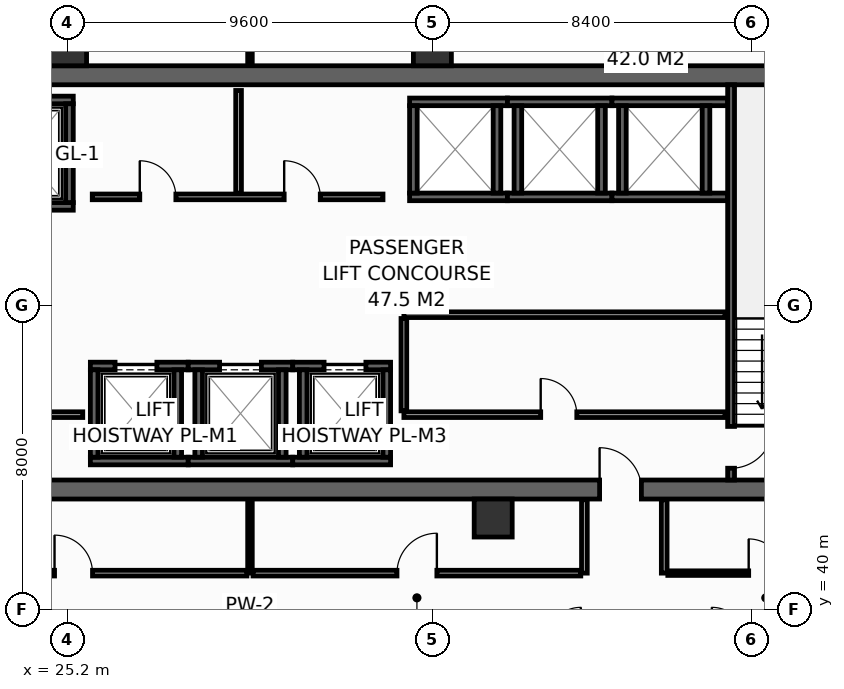
"""IFC4 building model, lengths in metres.
Left out: names, types, materials, properties, quantities, classifications, styles, units other than length and angle.
Written with IfcOpenShell. Run it as: python <this file> out.ifc"""

import sys

from ifc_helpers import new_model, si_unit, direction, frame, frame_2d, origin, origin_2d, place, context, subcontext, project, spatial, rectangle, hollow_rectangle, extrude, element, fill, save


model = new_model("IFC4")
c1 = context("Model", 3, precision=1e-05, world=origin(), true_north=direction((0.0, 1.0)))
c2 = subcontext(c1, "Body", "Model", "MODEL_VIEW")
j1 = project(units=[si_unit("LENGTHUNIT", "METRE"), si_unit("PLANEANGLEUNIT", "RADIAN")], contexts=[c1])
p1 = place(None, origin())
s1 = spatial("IfcSite", under=j1, at=p1, CompositionType="ELEMENT")
p2 = place(p1, origin())
s2 = spatial("IfcBuilding", under=s1, at=p2, CompositionType="ELEMENT")
p3 = place(p2, frame((0.0, 0.0, 148.6)))
s3 = spatial("IfcBuildingStorey", under=s2, at=p3, CompositionType="ELEMENT", Elevation=148.6)
p4 = place(p3, frame((13.6, 43.15, 0.0), z_axis=(0.0, 0.0, 1.0), x_axis=(1.0, 0.0, 0.0)))
e1 = element("IfcWall", 1, at=p4, inside=s3, PredefinedType="SHEAR", context=c2, shape_type="SweptSolid", body=[
    extrude(rectangle(XDim=32.7, YDim=0.5, at=frame_2d((16.35, 0.0))), origin(), (0.0, 0.0, 1.0), 3.55),
])
p5 = place(p4, frame((5.4, 0.0, 0.0)))
e2 = element("IfcOpeningElement", 2, at=p5, cuts=e1, PredefinedType="OPENING", context=c2, shape_type="SweptSolid", body=[
    extrude(rectangle(XDim=1.1, YDim=2.15, at=frame_2d((0.55, 1.075))), frame((0.0, 0.26, 0.0), z_axis=(0.0, -1.0, 0.0), x_axis=(1.0, 0.0, 0.0)), (0.0, 0.0, 1.0), 0.52),
])
p6 = place(p4, frame((25.6, 0.0, 0.0)))
e3 = element("IfcOpeningElement", 3, at=p6, cuts=e1, PredefinedType="OPENING", context=c2, shape_type="SweptSolid", body=[
    extrude(rectangle(XDim=1.1, YDim=2.15, at=frame_2d((0.55, 1.075))), frame((0.0, 0.26, 0.0), z_axis=(0.0, -1.0, 0.0), x_axis=(1.0, 0.0, 0.0)), (0.0, 0.0, 1.0), 0.52),
])
p7 = place(p3, frame((13.6, 54.05, 0.0), z_axis=(0.0, 0.0, 1.0), x_axis=(1.0, 0.0, 0.0)))
e4 = element("IfcWall", 4, at=p7, inside=s3, PredefinedType="SHEAR", context=c2, shape_type="SweptSolid", body=[
    extrude(rectangle(XDim=32.7, YDim=0.5, at=frame_2d((16.35, 0.0))), origin(), (0.0, 0.0, 1.0), 3.55),
])
for number, where, z_axis, x_axis in (
    (5, (25.2, 54.8, 0.0), (0.0, 0.0, 1.0), (1.0, 0.0, 0.0)),
    (6, (34.8, 54.8, 0.0), (0.0, 0.0, 1.0), (1.0, 0.0, 0.0)),
    (7, (36.4, 42.4, 0.0), (0.0, 0.0, 1.0), (1.0, 0.0, 0.0)),
):
    element("IfcColumn", number, at=place(p3, frame(where, z_axis=z_axis, x_axis=x_axis)), inside=s3, PredefinedType="COLUMN", context=c2, shape_type="SweptSolid", body=[
        extrude(hollow_rectangle(XDim=1.0, YDim=1.0, WallThickness=0.045, at=origin_2d()), origin(), (0.0, 0.0, 1.0), 3.8),
    ])
p8 = place(p3, frame((22.5, 50.6, 0.0), z_axis=(0.0, 0.0, 1.0), x_axis=(1.0, 0.0, 0.0)))
e8 = element("IfcWall", 8, at=p8, inside=s3, PredefinedType="SHEAR", context=c2, shape_type="SweptSolid", body=[
    extrude(rectangle(XDim=2.85, YDim=0.2, at=frame_2d((1.425, 0.0))), origin(), (0.0, 0.0, 1.0), 3.55),
])
p9 = place(p8, frame((0.925, 0.0, 0.0)))
e9 = element("IfcOpeningElement", 9, at=p9, cuts=e8, PredefinedType="OPENING", context=c2, shape_type="SweptSolid", body=[
    extrude(rectangle(XDim=1.25, YDim=2.3, at=frame_2d((0.625, 1.15))), frame((0.0, 0.11, 0.0), z_axis=(0.0, -1.0, 0.0), x_axis=(1.0, 0.0, 0.0)), (0.0, 0.0, 1.0), 0.22),
])
p10 = place(p3, frame((22.5, 53.4, 0.0), z_axis=(0.0, 0.0, 1.0), x_axis=(1.0, 0.0, 0.0)))
e10 = element("IfcWall", 10, at=p10, inside=s3, PredefinedType="SHEAR", context=c2, shape_type="SweptSolid", body=[
    extrude(rectangle(XDim=2.85, YDim=0.2, at=frame_2d((1.425, 0.0))), origin(), (0.0, 0.0, 1.0), 3.55),
])
p11 = place(p3, frame((25.25, 50.7, 0.0), z_axis=(0.0, 0.0, 1.0), x_axis=(0.0, 1.0, 0.0)))
e11 = element("IfcWall", 11, at=p11, inside=s3, PredefinedType="SHEAR", context=c2, shape_type="SweptSolid", body=[
    extrude(rectangle(XDim=2.6, YDim=0.2, at=frame_2d((1.3, 0.0))), origin(), (0.0, 0.0, 1.0), 3.55),
])
p12 = place(p3, frame((25.8, 43.9, 0.0), z_axis=(0.0, 0.0, 1.0), x_axis=(1.0, 0.0, 0.0)))
e12 = element("IfcWall", 12, at=p12, inside=s3, PredefinedType="SHEAR", context=c2, shape_type="SweptSolid", body=[
    extrude(rectangle(XDim=2.575, YDim=0.2, at=frame_2d((1.288, 0.0))), origin(), (0.0, 0.0, 1.0), 3.55),
])
p13 = place(p3, frame((25.8, 46.4, 0.0), z_axis=(0.0, 0.0, 1.0), x_axis=(1.0, 0.0, 0.0)))
e13 = element("IfcWall", 13, at=p13, inside=s3, PredefinedType="SHEAR", context=c2, shape_type="SweptSolid", body=[
    extrude(rectangle(XDim=2.575, YDim=0.2, at=frame_2d((1.288, 0.0))), origin(), (0.0, 0.0, 1.0), 3.55),
])
p14 = place(p13, frame((0.65, 0.0, 0.0)))
e14 = element("IfcOpeningElement", 14, at=p14, cuts=e13, PredefinedType="OPENING", context=c2, shape_type="SweptSolid", body=[
    extrude(rectangle(XDim=1.1, YDim=2.2, at=frame_2d((0.55, 1.1))), frame((0.0, 0.11, 0.0), z_axis=(0.0, -1.0, 0.0), x_axis=(1.0, 0.0, 0.0)), (0.0, 0.0, 1.0), 0.22),
])
for number, where, z_axis, x_axis in (
    (15, (25.9, 44.0, 0.0), (0.0, 0.0, 1.0), (0.0, 1.0, 0.0)),
    (16, (28.1, 44.0, 0.0), (0.0, 0.0, 1.0), (0.0, 1.0, 0.0)),
):
    element("IfcWall", number, at=place(p3, frame(where, z_axis=z_axis, x_axis=x_axis)), inside=s3, PredefinedType="SHEAR", context=c2, shape_type="SweptSolid", body=[
        extrude(rectangle(XDim=2.3, YDim=0.2, at=frame_2d((1.15, 0.0))), origin(), (0.0, 0.0, 1.0), 3.55),
    ])
p15 = place(p3, frame((28.375, 43.9, 0.0), z_axis=(0.0, 0.0, 1.0), x_axis=(1.0, 0.0, 0.0)))
e17 = element("IfcWall", 17, at=p15, inside=s3, PredefinedType="SHEAR", context=c2, shape_type="SweptSolid", body=[
    extrude(rectangle(XDim=2.75, YDim=0.2, at=frame_2d((1.375, 0.0))), origin(), (0.0, 0.0, 1.0), 3.55),
])
p16 = place(p3, frame((28.375, 46.4, 0.0), z_axis=(0.0, 0.0, 1.0), x_axis=(1.0, 0.0, 0.0)))
e18 = element("IfcWall", 18, at=p16, inside=s3, PredefinedType="SHEAR", context=c2, shape_type="SweptSolid", body=[
    extrude(rectangle(XDim=2.75, YDim=0.2, at=frame_2d((1.375, 0.0))), origin(), (0.0, 0.0, 1.0), 3.55),
])
p17 = place(p16, frame((0.825, 0.0, 0.0)))
e19 = element("IfcOpeningElement", 19, at=p17, cuts=e18, PredefinedType="OPENING", context=c2, shape_type="SweptSolid", body=[
    extrude(rectangle(XDim=1.1, YDim=2.2, at=frame_2d((0.55, 1.1))), frame((0.0, 0.11, 0.0), z_axis=(0.0, -1.0, 0.0), x_axis=(1.0, 0.0, 0.0)), (0.0, 0.0, 1.0), 0.22),
])
for number, where, z_axis, x_axis in (
    (20, (28.65, 44.0, 0.0), (0.0, 0.0, 1.0), (0.0, 1.0, 0.0)),
    (21, (30.85, 44.0, 0.0), (0.0, 0.0, 1.0), (0.0, 1.0, 0.0)),
):
    element("IfcWall", number, at=place(p3, frame(where, z_axis=z_axis, x_axis=x_axis)), inside=s3, PredefinedType="SHEAR", context=c2, shape_type="SweptSolid", body=[
        extrude(rectangle(XDim=2.3, YDim=0.2, at=frame_2d((1.15, 0.0))), origin(), (0.0, 0.0, 1.0), 3.55),
    ])
p18 = place(p3, frame((31.125, 43.9, 0.0), z_axis=(0.0, 0.0, 1.0), x_axis=(1.0, 0.0, 0.0)))
e22 = element("IfcWall", 22, at=p18, inside=s3, PredefinedType="SHEAR", context=c2, shape_type="SweptSolid", body=[
    extrude(rectangle(XDim=2.575, YDim=0.2, at=frame_2d((1.288, 0.0))), origin(), (0.0, 0.0, 1.0), 3.55),
])
p19 = place(p3, frame((31.125, 46.4, 0.0), z_axis=(0.0, 0.0, 1.0), x_axis=(1.0, 0.0, 0.0)))
e23 = element("IfcWall", 23, at=p19, inside=s3, PredefinedType="SHEAR", context=c2, shape_type="SweptSolid", body=[
    extrude(rectangle(XDim=2.575, YDim=0.2, at=frame_2d((1.288, 0.0))), origin(), (0.0, 0.0, 1.0), 3.55),
])
p20 = place(p19, frame((0.825, 0.0, 0.0)))
e24 = element("IfcOpeningElement", 24, at=p20, cuts=e23, PredefinedType="OPENING", context=c2, shape_type="SweptSolid", body=[
    extrude(rectangle(XDim=1.1, YDim=2.2, at=frame_2d((0.55, 1.1))), frame((0.0, 0.11, 0.0), z_axis=(0.0, -1.0, 0.0), x_axis=(1.0, 0.0, 0.0)), (0.0, 0.0, 1.0), 0.22),
])
for number, where, z_axis, x_axis in (
    (25, (31.4, 44.0, 0.0), (0.0, 0.0, 1.0), (0.0, 1.0, 0.0)),
    (26, (33.6, 44.0, 0.0), (0.0, 0.0, 1.0), (0.0, 1.0, 0.0)),
):
    element("IfcWall", number, at=place(p3, frame(where, z_axis=z_axis, x_axis=x_axis)), inside=s3, PredefinedType="SHEAR", context=c2, shape_type="SweptSolid", body=[
        extrude(rectangle(XDim=2.3, YDim=0.2, at=frame_2d((1.15, 0.0))), origin(), (0.0, 0.0, 1.0), 3.55),
    ])
for number, where, z_axis, x_axis in (
    (27, (34.2, 50.85, 0.0), (0.0, 0.0, 1.0), (1.0, 0.0, 0.0)),
    (28, (34.2, 53.35, 0.0), (0.0, 0.0, 1.0), (1.0, 0.0, 0.0)),
):
    element("IfcWall", number, at=place(p3, frame(where, z_axis=z_axis, x_axis=x_axis)), inside=s3, PredefinedType="SHEAR", context=c2, shape_type="SweptSolid", body=[
        extrude(rectangle(XDim=2.575, YDim=0.2, at=frame_2d((1.288, 0.0))), origin(), (0.0, 0.0, 1.0), 3.55),
    ])
for number, where, z_axis, x_axis in (
    (29, (34.3, 50.95, 0.0), (0.0, 0.0, 1.0), (0.0, 1.0, 0.0)),
    (30, (36.5, 50.95, 0.0), (0.0, 0.0, 1.0), (0.0, 1.0, 0.0)),
):
    element("IfcWall", number, at=place(p3, frame(where, z_axis=z_axis, x_axis=x_axis)), inside=s3, PredefinedType="SHEAR", context=c2, shape_type="SweptSolid", body=[
        extrude(rectangle(XDim=2.3, YDim=0.2, at=frame_2d((1.15, 0.0))), origin(), (0.0, 0.0, 1.0), 3.55),
    ])
for number, where, z_axis, x_axis in (
    (31, (36.775, 50.85, 0.0), (0.0, 0.0, 1.0), (1.0, 0.0, 0.0)),
    (32, (36.775, 53.35, 0.0), (0.0, 0.0, 1.0), (1.0, 0.0, 0.0)),
):
    element("IfcWall", number, at=place(p3, frame(where, z_axis=z_axis, x_axis=x_axis)), inside=s3, PredefinedType="SHEAR", context=c2, shape_type="SweptSolid", body=[
        extrude(rectangle(XDim=2.75, YDim=0.2, at=frame_2d((1.375, 0.0))), origin(), (0.0, 0.0, 1.0), 3.55),
    ])
for number, where, z_axis, x_axis in (
    (33, (37.05, 50.95, 0.0), (0.0, 0.0, 1.0), (0.0, 1.0, 0.0)),
    (34, (39.25, 50.95, 0.0), (0.0, 0.0, 1.0), (0.0, 1.0, 0.0)),
):
    element("IfcWall", number, at=place(p3, frame(where, z_axis=z_axis, x_axis=x_axis)), inside=s3, PredefinedType="SHEAR", context=c2, shape_type="SweptSolid", body=[
        extrude(rectangle(XDim=2.3, YDim=0.2, at=frame_2d((1.15, 0.0))), origin(), (0.0, 0.0, 1.0), 3.55),
    ])
for number, where, z_axis, x_axis in (
    (35, (39.525, 50.85, 0.0), (0.0, 0.0, 1.0), (1.0, 0.0, 0.0)),
    (36, (39.525, 53.35, 0.0), (0.0, 0.0, 1.0), (1.0, 0.0, 0.0)),
):
    element("IfcWall", number, at=place(p3, frame(where, z_axis=z_axis, x_axis=x_axis)), inside=s3, PredefinedType="SHEAR", context=c2, shape_type="SweptSolid", body=[
        extrude(rectangle(XDim=3.045, YDim=0.2, at=frame_2d((1.522, 0.0))), origin(), (0.0, 0.0, 1.0), 3.55),
    ])
for number, where, z_axis, x_axis in (
    (37, (39.8, 50.95, 0.0), (0.0, 0.0, 1.0), (0.0, 1.0, 0.0)),
    (38, (42.0, 50.95, 0.0), (0.0, 0.0, 1.0), (0.0, 1.0, 0.0)),
):
    element("IfcWall", number, at=place(p3, frame(where, z_axis=z_axis, x_axis=x_axis)), inside=s3, PredefinedType="SHEAR", context=c2, shape_type="SweptSolid", body=[
        extrude(rectangle(XDim=2.3, YDim=0.2, at=frame_2d((1.15, 0.0))), origin(), (0.0, 0.0, 1.0), 3.55),
    ])
p21 = place(p3, frame((42.66, 53.8, 0.0), z_axis=(0.0, 0.0, 1.0), x_axis=(0.0, -1.0, 0.0)))
e39 = element("IfcWall", 39, at=p21, inside=s3, PredefinedType="SHEAR", context=c2, shape_type="SweptSolid", body=[
    extrude(rectangle(XDim=10.4, YDim=0.18, at=frame_2d((5.2, 0.0))), origin(), (0.0, 0.0, 1.0), 3.55),
])
p22 = place(p21, frame((8.99, 0.0, 0.0)))
e40 = element("IfcOpeningElement", 40, at=p22, cuts=e39, PredefinedType="OPENING", context=c2, shape_type="SweptSolid", body=[
    extrude(rectangle(XDim=1.1, YDim=2.15, at=frame_2d((0.55, 1.075))), frame((0.0, 0.1, 0.0), z_axis=(0.0, -1.0, 0.0), x_axis=(1.0, 0.0, 0.0)), (0.0, 0.0, 1.0), 0.2),
])
p23 = place(p3, frame((22.68, 45.12, 0.0), z_axis=(0.0, 0.0, 1.0), x_axis=(1.0, 0.0, 0.0)))
e41 = element("IfcWall", 41, at=p23, inside=s3, PredefinedType="PARTITIONING", context=c2, shape_type="SweptSolid", body=[
    extrude(rectangle(XDim=2.92, YDim=0.15, at=frame_2d((1.46, 0.0))), origin(), (0.0, 0.0, 1.0), 3.55),
])
p24 = place(p23, frame((0.85, 0.0, 0.0)))
e42 = element("IfcOpeningElement", 42, at=p24, cuts=e41, PredefinedType="OPENING", context=c2, shape_type="SweptSolid", body=[
    extrude(rectangle(XDim=1.1, YDim=2.15, at=frame_2d((0.55, 1.075))), frame((0.0, 0.085, 0.0), z_axis=(0.0, -1.0, 0.0), x_axis=(1.0, 0.0, 0.0)), (0.0, 0.0, 1.0), 0.17),
])
p25 = place(p3, frame((34.05, 45.12, 0.0), z_axis=(0.0, 0.0, 1.0), x_axis=(1.0, 0.0, 0.0)))
e43 = element("IfcWall", 43, at=p25, inside=s3, PredefinedType="PARTITIONING", context=c2, shape_type="SweptSolid", body=[
    extrude(rectangle(XDim=8.45, YDim=0.15, at=frame_2d((4.225, 0.0))), origin(), (0.0, 0.0, 1.0), 3.55),
])
p26 = place(p25, frame((3.6, 0.0, 0.0)))
e44 = element("IfcOpeningElement", 44, at=p26, cuts=e43, PredefinedType="OPENING", context=c2, shape_type="SweptSolid", body=[
    extrude(rectangle(XDim=0.95, YDim=2.15, at=frame_2d((0.475, 1.075))), frame((0.0, 0.085, 0.0), z_axis=(0.0, -1.0, 0.0), x_axis=(1.0, 0.0, 0.0)), (0.0, 0.0, 1.0), 0.17),
])
p27 = place(p3, frame((34.05, 47.75, 0.0), z_axis=(0.0, 0.0, 1.0), x_axis=(1.0, 0.0, 0.0)))
e45 = element("IfcWall", 45, at=p27, inside=s3, PredefinedType="PARTITIONING", context=c2, shape_type="SweptSolid", body=[
    extrude(rectangle(XDim=8.45, YDim=0.15, at=frame_2d((4.225, 0.0))), origin(), (0.0, 0.0, 1.0), 3.55),
])
p28 = place(p3, frame((34.05, 45.22, 0.0), z_axis=(0.0, 0.0, 1.0), x_axis=(0.0, 1.0, 0.0)))
e46 = element("IfcWall", 46, at=p28, inside=s3, PredefinedType="PARTITIONING", context=c2, shape_type="SweptSolid", body=[
    extrude(rectangle(XDim=2.43, YDim=0.15, at=frame_2d((1.215, 0.0))), origin(), (0.0, 0.0, 1.0), 3.55),
])
p29 = place(p3, frame((25.85, 50.85, 0.0), z_axis=(0.0, 0.0, 1.0), x_axis=(1.0, 0.0, 0.0)))
e47 = element("IfcWall", 47, at=p29, inside=s3, PredefinedType="PARTITIONING", context=c2, shape_type="SweptSolid", body=[
    extrude(rectangle(XDim=7.65, YDim=0.15, at=frame_2d((3.825, 0.0))), origin(), (0.0, 0.0, 1.0), 3.55),
])
p30 = place(p29, frame((1.25, 0.0, 0.0)))
e48 = element("IfcOpeningElement", 48, at=p30, cuts=e47, PredefinedType="OPENING", context=c2, shape_type="SweptSolid", body=[
    extrude(rectangle(XDim=0.95, YDim=2.15, at=frame_2d((0.475, 1.075))), frame((0.0, 0.085, 0.0), z_axis=(0.0, -1.0, 0.0), x_axis=(1.0, 0.0, 0.0)), (0.0, 0.0, 1.0), 0.17),
])
p31 = place(p29, frame((5.05, 0.0, 0.0)))
e49 = element("IfcOpeningElement", 49, at=p31, cuts=e47, PredefinedType="OPENING", context=c2, shape_type="SweptSolid", body=[
    extrude(rectangle(XDim=0.95, YDim=2.15, at=frame_2d((0.475, 1.075))), frame((0.0, 0.085, 0.0), z_axis=(0.0, -1.0, 0.0), x_axis=(1.0, 0.0, 0.0)), (0.0, 0.0, 1.0), 0.17),
])
p32 = place(p3, frame((29.7, 50.95, 0.0), z_axis=(0.0, 0.0, 1.0), x_axis=(0.0, 1.0, 0.0)))
e50 = element("IfcWall", 50, at=p32, inside=s3, PredefinedType="PARTITIONING", context=c2, shape_type="SweptSolid", body=[
    extrude(rectangle(XDim=2.7, YDim=0.15, at=frame_2d((1.35, 0.0))), origin(), (0.0, 0.0, 1.0), 3.55),
])
p33 = place(p3, frame((30.0, 54.32, 0.0), z_axis=(0.0, 0.0, 1.0), x_axis=(0.0, 1.0, 0.0)))
e51 = element("IfcWall", 51, at=p33, inside=s3, PredefinedType="PARTITIONING", context=c2, shape_type="SweptSolid", body=[
    extrude(rectangle(XDim=1.675, YDim=0.12, at=frame_2d((0.837, 0.0))), origin(), (0.0, 0.0, 1.0), 2.935),
])
for number, where, z_axis, x_axis in (
    (52, (38.8, 40.95, 0.0), (0.0, 0.0, 1.0), (0.0, 1.0, 0.0)),
    (53, (40.9, 40.95, 0.0), (0.0, 0.0, 1.0), (0.0, 1.0, 0.0)),
):
    element("IfcWall", number, at=place(p3, frame(where, z_axis=z_axis, x_axis=x_axis)), inside=s3, PredefinedType="PARTITIONING", context=c2, shape_type="SweptSolid", body=[
        extrude(rectangle(XDim=1.93, YDim=0.15, at=frame_2d((0.965, 0.0))), origin(), (0.0, 0.0, 1.0), 3.55),
    ])
p34 = place(p3, frame((30.0, 40.95, 0.0), z_axis=(0.0, 0.0, 1.0), x_axis=(0.0, 1.0, 0.0)))
e54 = element("IfcWall", 54, at=p34, inside=s3, PredefinedType="PARTITIONING", context=c2, shape_type="SweptSolid", body=[
    extrude(rectangle(XDim=1.93, YDim=0.12, at=frame_2d((0.965, 0.0))), origin(), (0.0, 0.0, 1.0), 2.835),
])
p35 = place(p3, frame((20.795, 40.95, 0.0), z_axis=(0.0, 0.0, 1.0), x_axis=(1.0, 0.0, 0.0)))
e55 = element("IfcWall", 55, at=p35, inside=s3, PredefinedType="PARTITIONING", context=c2, shape_type="SweptSolid", body=[
    extrude(rectangle(XDim=9.125, YDim=0.15, at=frame_2d((4.562, 0.0))), origin(), (0.0, 0.0, 1.0), 2.835),
])
p36 = place(p35, frame((4.062, 0.0, 0.0)))
e56 = element("IfcOpeningElement", 56, at=p36, cuts=e55, PredefinedType="OPENING", context=c2, shape_type="SweptSolid", body=[
    extrude(rectangle(XDim=1.0, YDim=2.15, at=frame_2d((0.5, 1.075))), frame((0.0, 0.085, 0.0), z_axis=(0.0, -1.0, 0.0), x_axis=(1.0, 0.0, 0.0)), (0.0, 0.0, 1.0), 0.17),
])
p37 = place(p3, frame((30.08, 40.95, 0.0), z_axis=(0.0, 0.0, 1.0), x_axis=(1.0, 0.0, 0.0)))
e57 = element("IfcWall", 57, at=p37, inside=s3, PredefinedType="PARTITIONING", context=c2, shape_type="SweptSolid", body=[
    extrude(rectangle(XDim=8.625, YDim=0.15, at=frame_2d((4.312, 0.0))), origin(), (0.0, 0.0, 1.0), 2.835),
])
p38 = place(p37, frame((3.788, 0.0, 0.0)))
e58 = element("IfcOpeningElement", 58, at=p38, cuts=e57, PredefinedType="OPENING", context=c2, shape_type="SweptSolid", body=[
    extrude(rectangle(XDim=1.05, YDim=2.15, at=frame_2d((0.525, 1.075))), frame((0.0, 0.085, 0.0), z_axis=(0.0, -1.0, 0.0), x_axis=(1.0, 0.0, 0.0)), (0.0, 0.0, 1.0), 0.17),
])
p39 = place(p3, frame((40.995, 40.95, 0.0), z_axis=(0.0, 0.0, 1.0), x_axis=(1.0, 0.0, 0.0)))
e59 = element("IfcWall", 59, at=p39, inside=s3, PredefinedType="PARTITIONING", context=c2, shape_type="SweptSolid", body=[
    extrude(rectangle(XDim=5.155, YDim=0.12, at=frame_2d((2.577, 0.0))), origin(), (0.0, 0.0, 1.0), 3.55),
])
p40 = place(p39, frame((2.128, 0.0, 0.0)))
e60 = element("IfcOpeningElement", 60, at=p40, cuts=e59, PredefinedType="OPENING", context=c2, shape_type="SweptSolid", body=[
    extrude(rectangle(XDim=0.9, YDim=2.1, at=frame_2d((0.45, 1.05))), frame((0.0, 0.07, 0.0), z_axis=(0.0, -1.0, 0.0), x_axis=(1.0, 0.0, 0.0)), (0.0, 0.0, 1.0), 0.14),
])
p41 = place(p14, origin())
e61 = element("IfcDoor", 61, at=p41, inside=s3, OperationType="SLIDING_TO_LEFT", PredefinedType="DOOR", context=c2, shape_type="SweptSolid", body=[
    extrude(rectangle(XDim=1.1, YDim=2.2, at=frame_2d((0.55, 1.1))), frame((0.0, 0.025, 0.0), z_axis=(0.0, -1.0, 0.0), x_axis=(1.0, 0.0, 0.0)), (0.0, 0.0, 1.0), 0.05),
])
fill(e14, e61)
p42 = place(p17, origin())
e62 = element("IfcDoor", 62, at=p42, inside=s3, OperationType="SLIDING_TO_LEFT", PredefinedType="DOOR", context=c2, shape_type="SweptSolid", body=[
    extrude(rectangle(XDim=1.1, YDim=2.2, at=frame_2d((0.55, 1.1))), frame((0.0, 0.025, 0.0), z_axis=(0.0, -1.0, 0.0), x_axis=(1.0, 0.0, 0.0)), (0.0, 0.0, 1.0), 0.05),
])
fill(e19, e62)
p43 = place(p20, origin())
e63 = element("IfcDoor", 63, at=p43, inside=s3, OperationType="SLIDING_TO_LEFT", PredefinedType="DOOR", context=c2, shape_type="SweptSolid", body=[
    extrude(rectangle(XDim=1.1, YDim=2.2, at=frame_2d((0.55, 1.1))), frame((0.0, 0.025, 0.0), z_axis=(0.0, -1.0, 0.0), x_axis=(1.0, 0.0, 0.0)), (0.0, 0.0, 1.0), 0.05),
])
fill(e24, e63)
p44 = place(p22, origin())
e64 = element("IfcDoor", 64, at=p44, inside=s3, OperationType="SINGLE_SWING_LEFT", PredefinedType="DOOR", context=c2, shape_type="SweptSolid", body=[
    extrude(rectangle(XDim=1.1, YDim=2.15, at=frame_2d((0.55, 1.075))), frame((0.0, 0.025, 0.0), z_axis=(0.0, -1.0, 0.0), x_axis=(1.0, 0.0, 0.0)), (0.0, 0.0, 1.0), 0.05),
])
fill(e40, e64)
p45 = place(p6, origin())
e65 = element("IfcDoor", 65, at=p45, inside=s3, OperationType="SINGLE_SWING_LEFT", PredefinedType="DOOR", context=c2, shape_type="SweptSolid", body=[
    extrude(rectangle(XDim=1.1, YDim=2.15, at=frame_2d((0.55, 1.075))), frame((0.0, 0.025, 0.0), z_axis=(0.0, -1.0, 0.0), x_axis=(1.0, 0.0, 0.0)), (0.0, 0.0, 1.0), 0.05),
])
fill(e3, e65)
p46 = place(p26, origin())
e66 = element("IfcDoor", 66, at=p46, inside=s3, OperationType="SINGLE_SWING_LEFT", PredefinedType="DOOR", context=c2, shape_type="SweptSolid", body=[
    extrude(rectangle(XDim=0.95, YDim=2.15, at=frame_2d((0.475, 1.075))), frame((0.0, 0.025, 0.0), z_axis=(0.0, -1.0, 0.0), x_axis=(1.0, 0.0, 0.0)), (0.0, 0.0, 1.0), 0.05),
])
fill(e44, e66)
p47 = place(p30, origin())
e67 = element("IfcDoor", 67, at=p47, inside=s3, OperationType="SINGLE_SWING_LEFT", PredefinedType="DOOR", context=c2, shape_type="SweptSolid", body=[
    extrude(rectangle(XDim=0.95, YDim=2.15, at=frame_2d((0.475, 1.075))), frame((0.0, 0.025, 0.0), z_axis=(0.0, -1.0, 0.0), x_axis=(1.0, 0.0, 0.0)), (0.0, 0.0, 1.0), 0.05),
])
fill(e48, e67)
p48 = place(p31, origin())
e68 = element("IfcDoor", 68, at=p48, inside=s3, OperationType="SINGLE_SWING_LEFT", PredefinedType="DOOR", context=c2, shape_type="SweptSolid", body=[
    extrude(rectangle(XDim=0.95, YDim=2.15, at=frame_2d((0.475, 1.075))), frame((0.0, 0.025, 0.0), z_axis=(0.0, -1.0, 0.0), x_axis=(1.0, 0.0, 0.0)), (0.0, 0.0, 1.0), 0.05),
])
fill(e49, e68)
p49 = place(p36, origin())
e69 = element("IfcDoor", 69, at=p49, inside=s3, OperationType="SINGLE_SWING_LEFT", PredefinedType="DOOR", context=c2, shape_type="SweptSolid", body=[
    extrude(rectangle(XDim=1.0, YDim=2.15, at=frame_2d((0.5, 1.075))), frame((0.0, 0.025, 0.0), z_axis=(0.0, -1.0, 0.0), x_axis=(1.0, 0.0, 0.0)), (0.0, 0.0, 1.0), 0.05),
])
fill(e56, e69)
p50 = place(p38, origin())
e70 = element("IfcDoor", 70, at=p50, inside=s3, OperationType="SINGLE_SWING_RIGHT", PredefinedType="DOOR", context=c2, shape_type="SweptSolid", body=[
    extrude(rectangle(XDim=1.05, YDim=2.15, at=frame_2d((0.525, 1.075))), frame((0.0, 0.025, 0.0), z_axis=(0.0, -1.0, 0.0), x_axis=(1.0, 0.0, 0.0)), (0.0, 0.0, 1.0), 0.05),
])
fill(e58, e70)
p51 = place(p40, origin())
e71 = element("IfcDoor", 71, at=p51, inside=s3, OperationType="SINGLE_SWING_LEFT", PredefinedType="DOOR", context=c2, shape_type="SweptSolid", body=[
    extrude(rectangle(XDim=0.9, YDim=2.1, at=frame_2d((0.45, 1.05))), frame((0.0, 0.025, 0.0), z_axis=(0.0, -1.0, 0.0), x_axis=(1.0, 0.0, 0.0)), (0.0, 0.0, 1.0), 0.05),
])
fill(e60, e71)
save(model, sys.argv[1])
